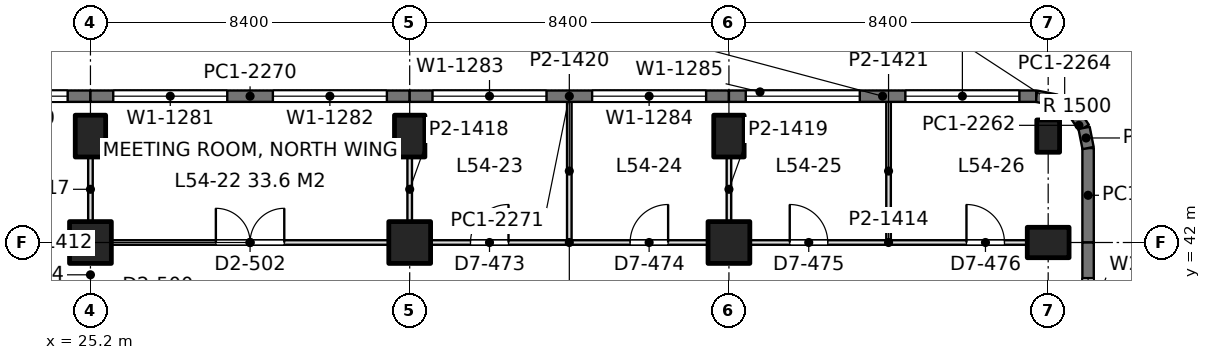
"""IFC4 building model, lengths in metres.
Left out: names, types, materials, properties, quantities, classifications, styles, units other than length and angle.
Written with IfcOpenShell. Run it as: python <this file> out.ifc"""

import sys

from ifc_helpers import new_model, si_unit, direction, frame, frame_2d, origin, origin_2d, place, context, subcontext, project, spatial, rectangle, extrude, element, fill, save


model = new_model("IFC4")
c1 = context("Model", 3, precision=1e-05, world=origin(), true_north=direction((0.0, 1.0)))
c2 = subcontext(c1, "Body", "Model", "MODEL_VIEW")
j1 = project(units=[si_unit("LENGTHUNIT", "METRE"), si_unit("PLANEANGLEUNIT", "RADIAN")], contexts=[c1])
p1 = place(None, origin())
s1 = spatial("IfcSite", under=j1, at=p1, CompositionType="ELEMENT")
p2 = place(p1, origin())
s2 = spatial("IfcBuilding", under=s1, at=p2, CompositionType="ELEMENT")
p3 = place(p2, frame((0.0, 0.0, 236.4)))
s3 = spatial("IfcBuildingStorey", under=s2, at=p3, CompositionType="ELEMENT", Elevation=236.4)
p4 = place(p3, frame((25.2, 42.0, 0.0), z_axis=(0.0, 0.0, 1.0), x_axis=(1.0, 0.0, 0.0)))
e1 = element("IfcColumn", 1, at=p4, inside=s3, PredefinedType="COLUMN", context=c2, shape_type="SweptSolid", body=[
    extrude(rectangle(XDim=1.1, YDim=1.1, at=origin_2d()), origin(), (0.0, 0.0, 1.0), 4.2),
])
p5 = place(p3, frame((25.2, 44.8, 0.0), z_axis=(0.0, 0.0, 1.0), x_axis=(1.0, 0.0, 0.0)))
e2 = element("IfcColumn", 2, at=p5, inside=s3, PredefinedType="COLUMN", context=c2, shape_type="SweptSolid", body=[
    extrude(rectangle(XDim=0.8, YDim=1.1, at=origin_2d()), origin(), (0.0, 0.0, 1.0), 4.2),
])
p6 = place(p3, frame((33.6, 42.0, 0.0), z_axis=(0.0, 0.0, 1.0), x_axis=(1.0, 0.0, 0.0)))
e3 = element("IfcColumn", 3, at=p6, inside=s3, PredefinedType="COLUMN", context=c2, shape_type="SweptSolid", body=[
    extrude(rectangle(XDim=1.1, YDim=1.1, at=origin_2d()), origin(), (0.0, 0.0, 1.0), 4.2),
])
p7 = place(p3, frame((33.6, 44.8, 0.0), z_axis=(0.0, 0.0, 1.0), x_axis=(1.0, 0.0, 0.0)))
e4 = element("IfcColumn", 4, at=p7, inside=s3, PredefinedType="COLUMN", context=c2, shape_type="SweptSolid", body=[
    extrude(rectangle(XDim=0.8, YDim=1.1, at=origin_2d()), origin(), (0.0, 0.0, 1.0), 4.2),
])
p8 = place(p3, frame((42.0, 42.0, 0.0), z_axis=(0.0, 0.0, 1.0), x_axis=(1.0, 0.0, 0.0)))
e5 = element("IfcColumn", 5, at=p8, inside=s3, PredefinedType="COLUMN", context=c2, shape_type="SweptSolid", body=[
    extrude(rectangle(XDim=1.1, YDim=1.1, at=origin_2d()), origin(), (0.0, 0.0, 1.0), 4.2),
])
for number, where, z_axis, x_axis in (
    (6, (42.0, 44.8, 0.0), (0.0, 0.0, 1.0), (1.0, 0.0, 0.0)),
    (7, (50.4, 42.0, 0.0), (0.0, 0.0, 1.0), (0.0, 1.0, 0.0)),
):
    element("IfcColumn", number, at=place(p3, frame(where, z_axis=z_axis, x_axis=x_axis)), inside=s3, PredefinedType="COLUMN", context=c2, shape_type="SweptSolid", body=[
        extrude(rectangle(XDim=0.8, YDim=1.1, at=origin_2d()), origin(), (0.0, 0.0, 1.0), 4.2),
    ])
p9 = place(p3, frame((50.4, 44.8, 0.0), z_axis=(0.0, 0.0, 1.0), x_axis=(1.0, 0.0, 0.0)))
e8 = element("IfcColumn", 8, at=p9, inside=s3, PredefinedType="COLUMN", context=c2, shape_type="SweptSolid", body=[
    extrude(rectangle(XDim=0.6, YDim=0.85, at=origin_2d()), origin(), (0.0, 0.0, 1.0), 4.2),
])
p10 = place(p3, frame((16.8, 45.85, 0.0), z_axis=(0.0, 0.0, 1.0), x_axis=(1.0, 0.0, 0.0)))
e9 = element("IfcWall", 9, at=p10, inside=s3, PredefinedType="SOLIDWALL", context=c2, shape_type="SweptSolid", body=[
    extrude(rectangle(XDim=8.4, YDim=0.3, at=frame_2d((4.2, 0.0))), origin(), (0.0, 0.0, 1.0), 4.05),
])
p11 = place(p10, frame((0.6, 0.0, 0.9)))
e10 = element("IfcOpeningElement", 10, at=p11, cuts=e9, PredefinedType="OPENING", context=c2, shape_type="SweptSolid", body=[
    extrude(rectangle(XDim=3.0, YDim=1.9, at=frame_2d((1.5, 0.95))), frame((0.0, 0.16, 0.0), z_axis=(0.0, -1.0, 0.0), x_axis=(1.0, 0.0, 0.0)), (0.0, 0.0, 1.0), 0.32),
])
p12 = place(p10, frame((4.8, 0.0, 0.9)))
e11 = element("IfcOpeningElement", 11, at=p12, cuts=e9, PredefinedType="OPENING", context=c2, shape_type="SweptSolid", body=[
    extrude(rectangle(XDim=3.0, YDim=1.9, at=frame_2d((1.5, 0.95))), frame((0.0, 0.16, 0.0), z_axis=(0.0, -1.0, 0.0), x_axis=(1.0, 0.0, 0.0)), (0.0, 0.0, 1.0), 0.32),
])
p13 = place(p3, frame((25.2, 45.85, 0.0), z_axis=(0.0, 0.0, 1.0), x_axis=(1.0, 0.0, 0.0)))
e12 = element("IfcWall", 12, at=p13, inside=s3, PredefinedType="SOLIDWALL", context=c2, shape_type="SweptSolid", body=[
    extrude(rectangle(XDim=8.4, YDim=0.3, at=frame_2d((4.2, 0.0))), origin(), (0.0, 0.0, 1.0), 4.05),
])
p14 = place(p13, frame((0.6, 0.0, 0.9)))
e13 = element("IfcOpeningElement", 13, at=p14, cuts=e12, PredefinedType="OPENING", context=c2, shape_type="SweptSolid", body=[
    extrude(rectangle(XDim=3.0, YDim=1.9, at=frame_2d((1.5, 0.95))), frame((0.0, 0.16, 0.0), z_axis=(0.0, -1.0, 0.0), x_axis=(1.0, 0.0, 0.0)), (0.0, 0.0, 1.0), 0.32),
])
p15 = place(p13, frame((4.8, 0.0, 0.9)))
e14 = element("IfcOpeningElement", 14, at=p15, cuts=e12, PredefinedType="OPENING", context=c2, shape_type="SweptSolid", body=[
    extrude(rectangle(XDim=3.0, YDim=1.9, at=frame_2d((1.5, 0.95))), frame((0.0, 0.16, 0.0), z_axis=(0.0, -1.0, 0.0), x_axis=(1.0, 0.0, 0.0)), (0.0, 0.0, 1.0), 0.32),
])
p16 = place(p3, frame((33.6, 45.85, 0.0), z_axis=(0.0, 0.0, 1.0), x_axis=(1.0, 0.0, 0.0)))
e15 = element("IfcWall", 15, at=p16, inside=s3, PredefinedType="SOLIDWALL", context=c2, shape_type="SweptSolid", body=[
    extrude(rectangle(XDim=8.4, YDim=0.3, at=frame_2d((4.2, 0.0))), origin(), (0.0, 0.0, 1.0), 4.05),
])
p17 = place(p16, frame((0.6, 0.0, 0.9)))
e16 = element("IfcOpeningElement", 16, at=p17, cuts=e15, PredefinedType="OPENING", context=c2, shape_type="SweptSolid", body=[
    extrude(rectangle(XDim=3.0, YDim=1.9, at=frame_2d((1.5, 0.95))), frame((0.0, 0.16, 0.0), z_axis=(0.0, -1.0, 0.0), x_axis=(1.0, 0.0, 0.0)), (0.0, 0.0, 1.0), 0.32),
])
p18 = place(p16, frame((4.8, 0.0, 0.9)))
e17 = element("IfcOpeningElement", 17, at=p18, cuts=e15, PredefinedType="OPENING", context=c2, shape_type="SweptSolid", body=[
    extrude(rectangle(XDim=3.0, YDim=1.9, at=frame_2d((1.5, 0.95))), frame((0.0, 0.16, 0.0), z_axis=(0.0, -1.0, 0.0), x_axis=(1.0, 0.0, 0.0)), (0.0, 0.0, 1.0), 0.32),
])
p19 = place(p3, frame((42.0, 45.85, 0.0), z_axis=(0.0, 0.0, 1.0), x_axis=(1.0, 0.0, 0.0)))
e18 = element("IfcWall", 18, at=p19, inside=s3, PredefinedType="SOLIDWALL", context=c2, shape_type="SweptSolid", body=[
    extrude(rectangle(XDim=8.085, YDim=0.3, at=frame_2d((4.042, 0.0))), origin(), (0.0, 0.0, 1.0), 4.05),
])
p20 = place(p19, frame((0.443, 0.0, 0.9)))
e19 = element("IfcOpeningElement", 19, at=p20, cuts=e18, PredefinedType="OPENING", context=c2, shape_type="SweptSolid", body=[
    extrude(rectangle(XDim=3.0, YDim=1.9, at=frame_2d((1.5, 0.95))), frame((0.0, 0.16, 0.0), z_axis=(0.0, -1.0, 0.0), x_axis=(1.0, 0.0, 0.0)), (0.0, 0.0, 1.0), 0.32),
])
p21 = place(p19, frame((4.643, 0.0, 0.9)))
e20 = element("IfcOpeningElement", 20, at=p21, cuts=e18, PredefinedType="OPENING", context=c2, shape_type="SweptSolid", body=[
    extrude(rectangle(XDim=3.0, YDim=1.9, at=frame_2d((1.5, 0.95))), frame((0.0, 0.16, 0.0), z_axis=(0.0, -1.0, 0.0), x_axis=(1.0, 0.0, 0.0)), (0.0, 0.0, 1.0), 0.32),
])
p22 = place(p3, frame((50.085, 45.85, 0.0), z_axis=(0.0, 0.0, 1.0), x_axis=(0.980702050465, -0.1955082817, 0.0)))
e21 = element("IfcWall", 21, at=p22, inside=s3, PredefinedType="SOLIDWALL", context=c2, shape_type="SweptSolid", body=[
    extrude(rectangle(XDim=0.541, YDim=0.3, at=frame_2d((0.271, 0.0))), origin(), (0.0, 0.0, 1.0), 4.05),
])
p23 = place(p3, frame((50.615, 45.744, 0.0), z_axis=(0.0, 0.0, 1.0), x_axis=(0.831692711774, -0.555236195849, 0.0)))
e22 = element("IfcWall", 22, at=p23, inside=s3, PredefinedType="SOLIDWALL", context=c2, shape_type="SweptSolid", body=[
    extrude(rectangle(XDim=0.525, YDim=0.3, at=frame_2d((0.263, 0.0))), origin(), (0.0, 0.0, 1.0), 4.05),
])
p24 = place(p3, frame((51.052, 45.453, 0.0), z_axis=(0.0, 0.0, 1.0), x_axis=(0.55534295404, -0.831621430339, 0.0)))
e23 = element("IfcWall", 23, at=p24, inside=s3, PredefinedType="SOLIDWALL", context=c2, shape_type="SweptSolid", body=[
    extrude(rectangle(XDim=0.526, YDim=0.3, at=frame_2d((0.263, 0.0))), origin(), (0.0, 0.0, 1.0), 4.05),
])
p25 = place(p3, frame((51.344, 45.015, 0.0), z_axis=(0.0, 0.0, 1.0), x_axis=(0.195073962632, -0.980788534345, 0.0)))
e24 = element("IfcWall", 24, at=p25, inside=s3, PredefinedType="SOLIDWALL", context=c2, shape_type="SweptSolid", body=[
    extrude(rectangle(XDim=0.541, YDim=0.3, at=frame_2d((0.271, 0.0))), origin(), (0.0, 0.0, 1.0), 4.05),
])
p26 = place(p3, frame((51.45, 44.485, 0.0), z_axis=(0.0, 0.0, 1.0), x_axis=(0.0, -1.0, 0.0)))
e25 = element("IfcWall", 25, at=p26, inside=s3, PredefinedType="SOLIDWALL", context=c2, shape_type="SweptSolid", body=[
    extrude(rectangle(XDim=2.485, YDim=0.3, at=frame_2d((1.243, 0.0))), origin(), (0.0, 0.0, 1.0), 4.05),
])
p27 = place(p3, frame((51.45, 42.0, 0.0), z_axis=(0.0, 0.0, 1.0), x_axis=(0.0, -1.0, 0.0)))
e26 = element("IfcWall", 26, at=p27, inside=s3, PredefinedType="SOLIDWALL", context=c2, shape_type="SweptSolid", body=[
    extrude(rectangle(XDim=4.275, YDim=0.3, at=frame_2d((2.137, 0.0))), origin(), (0.0, 0.0, 1.0), 4.05),
])
p28 = place(p27, frame((0.938, 0.0, 0.9)))
e27 = element("IfcOpeningElement", 27, at=p28, cuts=e26, PredefinedType="OPENING", context=c2, shape_type="SweptSolid", body=[
    extrude(rectangle(XDim=2.4, YDim=1.9, at=frame_2d((1.2, 0.95))), frame((0.0, 0.16, 0.0), z_axis=(0.0, -1.0, 0.0), x_axis=(1.0, 0.0, 0.0)), (0.0, 0.0, 1.0), 0.32),
])
p29 = place(p3, frame((25.749, 42.0, 0.0), z_axis=(0.0, 0.0, 1.0), x_axis=(1.0, 0.0, 0.0)))
e28 = element("IfcWall", 28, at=p29, inside=s3, PredefinedType="PARTITIONING", context=c2, shape_type="SweptSolid", body=[
    extrude(rectangle(XDim=7.302, YDim=0.12, at=frame_2d((3.651, 0.0))), origin(), (0.0, 0.0, 1.0), 3.55),
])
p30 = place(p29, frame((2.751, 0.0, 0.0)))
e29 = element("IfcOpeningElement", 29, at=p30, cuts=e28, PredefinedType="OPENING", context=c2, shape_type="SweptSolid", body=[
    extrude(rectangle(XDim=1.8, YDim=2.2, at=frame_2d((0.9, 1.1))), frame((0.0, 0.07, 0.0), z_axis=(0.0, -1.0, 0.0), x_axis=(1.0, 0.0, 0.0)), (0.0, 0.0, 1.0), 0.14),
])
p31 = place(p3, frame((34.149, 42.0, 0.0), z_axis=(0.0, 0.0, 1.0), x_axis=(1.0, 0.0, 0.0)))
e30 = element("IfcWall", 30, at=p31, inside=s3, PredefinedType="PARTITIONING", context=c2, shape_type="SweptSolid", body=[
    extrude(rectangle(XDim=7.302, YDim=0.12, at=frame_2d((3.651, 0.0))), origin(), (0.0, 0.0, 1.0), 3.55),
])
p32 = place(p31, frame((1.051, 0.0, 0.0)))
e31 = element("IfcOpeningElement", 31, at=p32, cuts=e30, PredefinedType="OPENING", context=c2, shape_type="SweptSolid", body=[
    extrude(rectangle(XDim=1.0, YDim=2.4, at=frame_2d((0.5, 1.2))), frame((0.0, 0.07, 0.0), z_axis=(0.0, -1.0, 0.0), x_axis=(1.0, 0.0, 0.0)), (0.0, 0.0, 1.0), 0.14),
])
p33 = place(p31, frame((5.251, 0.0, 0.0)))
e32 = element("IfcOpeningElement", 32, at=p33, cuts=e30, PredefinedType="OPENING", context=c2, shape_type="SweptSolid", body=[
    extrude(rectangle(XDim=1.0, YDim=2.4, at=frame_2d((0.5, 1.2))), frame((0.0, 0.07, 0.0), z_axis=(0.0, -1.0, 0.0), x_axis=(1.0, 0.0, 0.0)), (0.0, 0.0, 1.0), 0.14),
])
p34 = place(p3, frame((42.549, 42.0, 0.0), z_axis=(0.0, 0.0, 1.0), x_axis=(1.0, 0.0, 0.0)))
e33 = element("IfcWall", 33, at=p34, inside=s3, PredefinedType="PARTITIONING", context=c2, shape_type="SweptSolid", body=[
    extrude(rectangle(XDim=7.302, YDim=0.12, at=frame_2d((3.651, 0.0))), origin(), (0.0, 0.0, 1.0), 3.55),
])
p35 = place(p34, frame((1.051, 0.0, 0.0)))
e34 = element("IfcOpeningElement", 34, at=p35, cuts=e33, PredefinedType="OPENING", context=c2, shape_type="SweptSolid", body=[
    extrude(rectangle(XDim=1.0, YDim=2.4, at=frame_2d((0.5, 1.2))), frame((0.0, 0.07, 0.0), z_axis=(0.0, -1.0, 0.0), x_axis=(1.0, 0.0, 0.0)), (0.0, 0.0, 1.0), 0.14),
])
p36 = place(p34, frame((5.701, 0.0, 0.0)))
e35 = element("IfcOpeningElement", 35, at=p36, cuts=e33, PredefinedType="OPENING", context=c2, shape_type="SweptSolid", body=[
    extrude(rectangle(XDim=1.0, YDim=2.4, at=frame_2d((0.5, 1.2))), frame((0.0, 0.07, 0.0), z_axis=(0.0, -1.0, 0.0), x_axis=(1.0, 0.0, 0.0)), (0.0, 0.0, 1.0), 0.14),
])
p37 = place(p3, frame((25.2, 42.549, 0.0), z_axis=(0.0, 0.0, 1.0), x_axis=(0.0, 1.0, 0.0)))
e36 = element("IfcWall", 36, at=p37, inside=s3, PredefinedType="PARTITIONING", context=c2, shape_type="SweptSolid", body=[
    extrude(rectangle(XDim=1.702, YDim=0.12, at=frame_2d((0.851, 0.0))), origin(), (0.0, 0.0, 1.0), 3.69),
])
p38 = place(p3, frame((33.6, 42.549, 0.0), z_axis=(0.0, 0.0, 1.0), x_axis=(0.0, 1.0, 0.0)))
e37 = element("IfcWall", 37, at=p38, inside=s3, PredefinedType="PARTITIONING", context=c2, shape_type="SweptSolid", body=[
    extrude(rectangle(XDim=1.702, YDim=0.12, at=frame_2d((0.851, 0.0))), origin(), (0.0, 0.0, 1.0), 3.15),
])
p39 = place(p3, frame((37.8, 42.058, 0.0), z_axis=(0.0, 0.0, 1.0), x_axis=(0.0, 1.0, 0.0)))
e38 = element("IfcWall", 38, at=p39, inside=s3, PredefinedType="PARTITIONING", context=c2, shape_type="SweptSolid", body=[
    extrude(rectangle(XDim=3.644, YDim=0.12, at=frame_2d((1.822, 0.0))), origin(), (0.0, 0.0, 1.0), 3.55),
])
p40 = place(p3, frame((42.0, 42.549, 0.0), z_axis=(0.0, 0.0, 1.0), x_axis=(0.0, 1.0, 0.0)))
e39 = element("IfcWall", 39, at=p40, inside=s3, PredefinedType="PARTITIONING", context=c2, shape_type="SweptSolid", body=[
    extrude(rectangle(XDim=1.702, YDim=0.12, at=frame_2d((0.851, 0.0))), origin(), (0.0, 0.0, 1.0), 3.15),
])
p41 = place(p3, frame((46.2, 42.058, 0.0), z_axis=(0.0, 0.0, 1.0), x_axis=(0.0, 1.0, 0.0)))
e40 = element("IfcWall", 40, at=p41, inside=s3, PredefinedType="PARTITIONING", context=c2, shape_type="SweptSolid", body=[
    extrude(rectangle(XDim=3.644, YDim=0.12, at=frame_2d((1.822, 0.0))), origin(), (0.0, 0.0, 1.0), 3.55),
])
p42 = place(p12, origin())
e41 = element("IfcWindow", 41, at=p42, inside=s3, PartitioningType="SINGLE_PANEL", PredefinedType="WINDOW", context=c2, shape_type="SweptSolid", body=[
    extrude(rectangle(XDim=3.0, YDim=1.9, at=frame_2d((1.5, 0.95))), frame((0.0, 0.03, 0.0), z_axis=(0.0, -1.0, 0.0), x_axis=(1.0, 0.0, 0.0)), (0.0, 0.0, 1.0), 0.06),
])
fill(e11, e41)
p43 = place(p14, origin())
e42 = element("IfcWindow", 42, at=p43, inside=s3, PartitioningType="SINGLE_PANEL", PredefinedType="WINDOW", context=c2, shape_type="SweptSolid", body=[
    extrude(rectangle(XDim=3.0, YDim=1.9, at=frame_2d((1.5, 0.95))), frame((0.0, 0.03, 0.0), z_axis=(0.0, -1.0, 0.0), x_axis=(1.0, 0.0, 0.0)), (0.0, 0.0, 1.0), 0.06),
])
fill(e13, e42)
p44 = place(p15, origin())
e43 = element("IfcWindow", 43, at=p44, inside=s3, PartitioningType="SINGLE_PANEL", PredefinedType="WINDOW", context=c2, shape_type="SweptSolid", body=[
    extrude(rectangle(XDim=3.0, YDim=1.9, at=frame_2d((1.5, 0.95))), frame((0.0, 0.03, 0.0), z_axis=(0.0, -1.0, 0.0), x_axis=(1.0, 0.0, 0.0)), (0.0, 0.0, 1.0), 0.06),
])
fill(e14, e43)
p45 = place(p17, origin())
e44 = element("IfcWindow", 44, at=p45, inside=s3, PartitioningType="SINGLE_PANEL", PredefinedType="WINDOW", context=c2, shape_type="SweptSolid", body=[
    extrude(rectangle(XDim=3.0, YDim=1.9, at=frame_2d((1.5, 0.95))), frame((0.0, 0.03, 0.0), z_axis=(0.0, -1.0, 0.0), x_axis=(1.0, 0.0, 0.0)), (0.0, 0.0, 1.0), 0.06),
])
fill(e16, e44)
p46 = place(p18, origin())
e45 = element("IfcWindow", 45, at=p46, inside=s3, PartitioningType="SINGLE_PANEL", PredefinedType="WINDOW", context=c2, shape_type="SweptSolid", body=[
    extrude(rectangle(XDim=3.0, YDim=1.9, at=frame_2d((1.5, 0.95))), frame((0.0, 0.03, 0.0), z_axis=(0.0, -1.0, 0.0), x_axis=(1.0, 0.0, 0.0)), (0.0, 0.0, 1.0), 0.06),
])
fill(e17, e45)
p47 = place(p20, origin())
e46 = element("IfcWindow", 46, at=p47, inside=s3, PartitioningType="SINGLE_PANEL", PredefinedType="WINDOW", context=c2, shape_type="SweptSolid", body=[
    extrude(rectangle(XDim=3.0, YDim=1.9, at=frame_2d((1.5, 0.95))), frame((0.0, 0.03, 0.0), z_axis=(0.0, -1.0, 0.0), x_axis=(1.0, 0.0, 0.0)), (0.0, 0.0, 1.0), 0.06),
])
fill(e19, e46)
p48 = place(p21, origin())
e47 = element("IfcWindow", 47, at=p48, inside=s3, PartitioningType="SINGLE_PANEL", PredefinedType="WINDOW", context=c2, shape_type="SweptSolid", body=[
    extrude(rectangle(XDim=3.0, YDim=1.9, at=frame_2d((1.5, 0.95))), frame((0.0, 0.03, 0.0), z_axis=(0.0, -1.0, 0.0), x_axis=(1.0, 0.0, 0.0)), (0.0, 0.0, 1.0), 0.06),
])
fill(e20, e47)
p49 = place(p28, origin())
e48 = element("IfcWindow", 48, at=p49, inside=s3, PartitioningType="SINGLE_PANEL", PredefinedType="WINDOW", context=c2, shape_type="SweptSolid", body=[
    extrude(rectangle(XDim=2.4, YDim=1.9, at=frame_2d((1.2, 0.95))), frame((0.0, 0.03, 0.0), z_axis=(0.0, -1.0, 0.0), x_axis=(1.0, 0.0, 0.0)), (0.0, 0.0, 1.0), 0.06),
])
fill(e27, e48)
p50 = place(p30, origin())
e49 = element("IfcDoor", 49, at=p50, inside=s3, OperationType="DOUBLE_DOOR_SINGLE_SWING", PredefinedType="DOOR", context=c2, shape_type="SweptSolid", body=[
    extrude(rectangle(XDim=1.8, YDim=2.2, at=frame_2d((0.9, 1.1))), frame((0.0, 0.025, 0.0), z_axis=(0.0, -1.0, 0.0), x_axis=(1.0, 0.0, 0.0)), (0.0, 0.0, 1.0), 0.05),
])
fill(e29, e49)
p51 = place(p32, origin())
e50 = element("IfcDoor", 50, at=p51, inside=s3, OperationType="SINGLE_SWING_RIGHT", PredefinedType="DOOR", context=c2, shape_type="SweptSolid", body=[
    extrude(rectangle(XDim=1.0, YDim=2.4, at=frame_2d((0.5, 1.2))), frame((0.0, 0.025, 0.0), z_axis=(0.0, -1.0, 0.0), x_axis=(1.0, 0.0, 0.0)), (0.0, 0.0, 1.0), 0.05),
])
fill(e31, e50)
p52 = place(p33, origin())
e51 = element("IfcDoor", 51, at=p52, inside=s3, OperationType="SINGLE_SWING_RIGHT", PredefinedType="DOOR", context=c2, shape_type="SweptSolid", body=[
    extrude(rectangle(XDim=1.0, YDim=2.4, at=frame_2d((0.5, 1.2))), frame((0.0, 0.025, 0.0), z_axis=(0.0, -1.0, 0.0), x_axis=(1.0, 0.0, 0.0)), (0.0, 0.0, 1.0), 0.05),
])
fill(e32, e51)
p53 = place(p35, origin())
e52 = element("IfcDoor", 52, at=p53, inside=s3, OperationType="SINGLE_SWING_LEFT", PredefinedType="DOOR", context=c2, shape_type="SweptSolid", body=[
    extrude(rectangle(XDim=1.0, YDim=2.4, at=frame_2d((0.5, 1.2))), frame((0.0, 0.025, 0.0), z_axis=(0.0, -1.0, 0.0), x_axis=(1.0, 0.0, 0.0)), (0.0, 0.0, 1.0), 0.05),
])
fill(e34, e52)
p54 = place(p36, origin())
e53 = element("IfcDoor", 53, at=p54, inside=s3, OperationType="SINGLE_SWING_LEFT", PredefinedType="DOOR", context=c2, shape_type="SweptSolid", body=[
    extrude(rectangle(XDim=1.0, YDim=2.4, at=frame_2d((0.5, 1.2))), frame((0.0, 0.025, 0.0), z_axis=(0.0, -1.0, 0.0), x_axis=(1.0, 0.0, 0.0)), (0.0, 0.0, 1.0), 0.05),
])
fill(e35, e53)
save(model, sys.argv[1])
